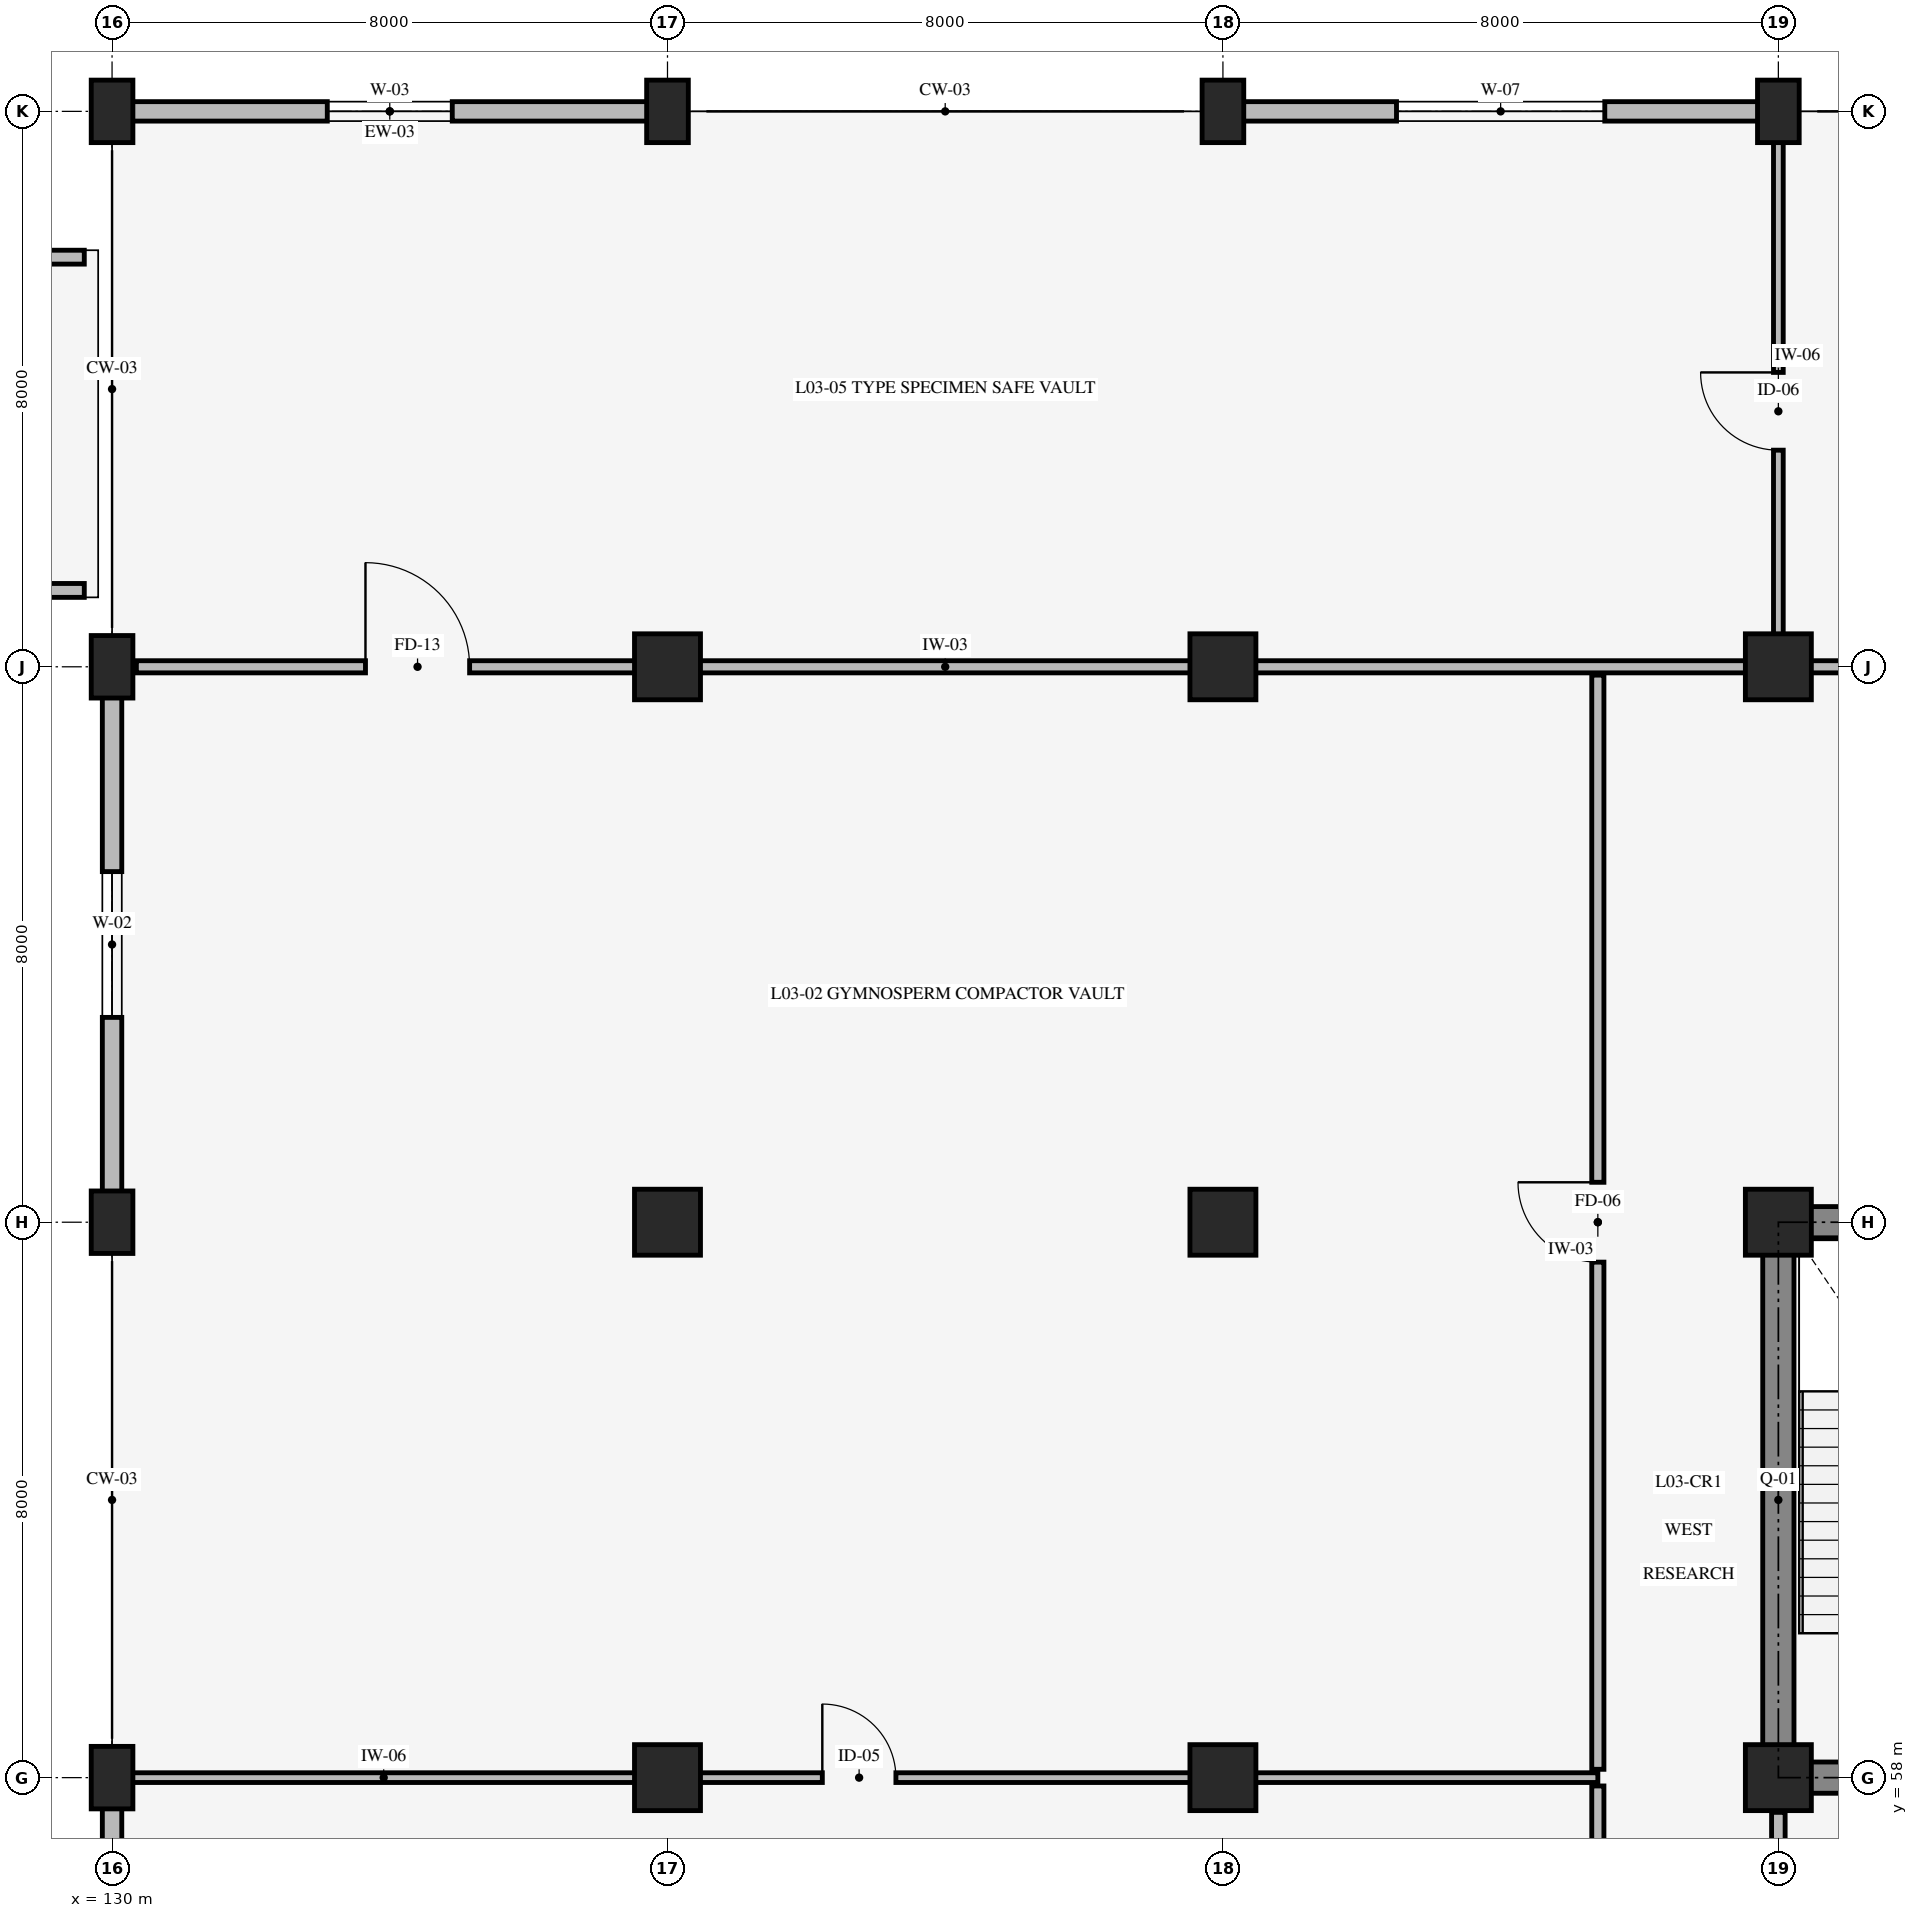
"""IFC4 building model, lengths in metres.
Left out: names, types, materials, properties, quantities, classifications, styles, units other than length and angle.
Written with IfcOpenShell. Run it as: python <this file> out.ifc"""

import sys

from ifc_helpers import new_model, si_unit, direction, frame, frame_2d, origin, origin_2d, place, context, subcontext, project, spatial, rectangle, extrude, element, fill, save


model = new_model("IFC4")
c1 = context("Model", 3, precision=1e-05, world=origin(), true_north=direction((0.0, 1.0)))
c2 = subcontext(c1, "Body", "Model", "MODEL_VIEW")
j1 = project(units=[si_unit("LENGTHUNIT", "METRE"), si_unit("PLANEANGLEUNIT", "RADIAN")], contexts=[c1])
p1 = place(None, origin())
s1 = spatial("IfcSite", under=j1, at=p1, CompositionType="ELEMENT")
p2 = place(p1, origin())
s2 = spatial("IfcBuilding", under=s1, at=p2, CompositionType="ELEMENT")
p3 = place(p2, frame((0.0, 0.0, 10.2)))
s3 = spatial("IfcBuildingStorey", under=s2, at=p3, CompositionType="ELEMENT", Elevation=10.2)
p4 = place(p3, frame((154.0, 58.0, 0.0), z_axis=(0.0, 0.0, 1.0), x_axis=(1.0, 0.0, 0.0)))
e1 = element("IfcWall", 1, at=p4, inside=s3, PredefinedType="SHEAR", context=c2, shape_type="SweptSolid", body=[
    extrude(rectangle(XDim=8.0, YDim=0.45, at=frame_2d((4.0, 0.0))), origin(), (0.0, 0.0, 1.0), 4.55),
])
p5 = place(p4, frame((1.4, 0.0, 0.0)))
e2 = element("IfcOpeningElement", 2, at=p5, cuts=e1, PredefinedType="OPENING", context=c2, shape_type="SweptSolid", body=[
    extrude(rectangle(XDim=1.3, YDim=2.15, at=frame_2d((0.65, 1.075))), frame((0.0, 0.235, 0.0), z_axis=(0.0, -1.0, 0.0), x_axis=(1.0, 0.0, 0.0)), (0.0, 0.0, 1.0), 0.47),
])
p6 = place(p4, frame((5.3, 0.0, 0.0)))
e3 = element("IfcOpeningElement", 3, at=p6, cuts=e1, PredefinedType="OPENING", context=c2, shape_type="SweptSolid", body=[
    extrude(rectangle(XDim=1.1, YDim=2.2, at=frame_2d((0.55, 1.1))), frame((0.0, 0.235, 0.0), z_axis=(0.0, -1.0, 0.0), x_axis=(1.0, 0.0, 0.0)), (0.0, 0.0, 1.0), 0.47),
])
for number, where, z_axis, x_axis in (
    (4, (162.0, 66.0, 0.0), (0.0, 0.0, 1.0), (-1.0, 0.0, 0.0)),
    (5, (154.0, 66.0, 0.0), (0.0, 0.0, 1.0), (0.0, -1.0, 0.0)),
):
    element("IfcWall", number, at=place(p3, frame(where, z_axis=z_axis, x_axis=x_axis)), inside=s3, PredefinedType="SHEAR", context=c2, shape_type="SweptSolid", body=[
        extrude(rectangle(XDim=8.0, YDim=0.45, at=frame_2d((4.0, 0.0))), origin(), (0.0, 0.0, 1.0), 4.55),
    ])
for number, where, z_axis, x_axis in (
    (6, (130.0, 58.0, 0.0), (0.0, 0.0, 1.0), (1.0, 0.0, 0.0)),
    (7, (130.0, 66.0, 0.0), (0.0, 0.0, 1.0), (1.0, 0.0, 0.0)),
    (8, (130.0, 74.0, 0.0), (0.0, 0.0, 1.0), (1.0, 0.0, 0.0)),
    (9, (130.0, 82.0, 0.0), (0.0, 0.0, 1.0), (1.0, 0.0, 0.0)),
):
    element("IfcColumn", number, at=place(p3, frame(where, z_axis=z_axis, x_axis=x_axis)), inside=s3, PredefinedType="COLUMN", context=c2, shape_type="SweptSolid", body=[
        extrude(rectangle(XDim=0.6, YDim=0.9, at=origin_2d()), origin(), (0.0, 0.0, 1.0), 4.8),
    ])
for number, where, z_axis, x_axis in (
    (10, (138.0, 58.0, 0.0), (0.0, 0.0, 1.0), (1.0, 0.0, 0.0)),
    (11, (138.0, 66.0, 0.0), (0.0, 0.0, 1.0), (1.0, 0.0, 0.0)),
    (12, (138.0, 74.0, 0.0), (0.0, 0.0, 1.0), (1.0, 0.0, 0.0)),
):
    element("IfcColumn", number, at=place(p3, frame(where, z_axis=z_axis, x_axis=x_axis)), inside=s3, PredefinedType="COLUMN", context=c2, shape_type="SweptSolid", body=[
        extrude(rectangle(XDim=0.95, YDim=0.95, at=origin_2d()), origin(), (0.0, 0.0, 1.0), 4.8),
    ])
p7 = place(p3, frame((138.0, 82.0, 0.0), z_axis=(0.0, 0.0, 1.0), x_axis=(1.0, 0.0, 0.0)))
e13 = element("IfcColumn", 13, at=p7, inside=s3, PredefinedType="COLUMN", context=c2, shape_type="SweptSolid", body=[
    extrude(rectangle(XDim=0.6, YDim=0.9, at=origin_2d()), origin(), (0.0, 0.0, 1.0), 4.8),
])
for number, where, z_axis, x_axis in (
    (14, (146.0, 58.0, 0.0), (0.0, 0.0, 1.0), (1.0, 0.0, 0.0)),
    (15, (146.0, 66.0, 0.0), (0.0, 0.0, 1.0), (1.0, 0.0, 0.0)),
    (16, (146.0, 74.0, 0.0), (0.0, 0.0, 1.0), (1.0, 0.0, 0.0)),
):
    element("IfcColumn", number, at=place(p3, frame(where, z_axis=z_axis, x_axis=x_axis)), inside=s3, PredefinedType="COLUMN", context=c2, shape_type="SweptSolid", body=[
        extrude(rectangle(XDim=0.95, YDim=0.95, at=origin_2d()), origin(), (0.0, 0.0, 1.0), 4.8),
    ])
p8 = place(p3, frame((146.0, 82.0, 0.0), z_axis=(0.0, 0.0, 1.0), x_axis=(1.0, 0.0, 0.0)))
e17 = element("IfcColumn", 17, at=p8, inside=s3, PredefinedType="COLUMN", context=c2, shape_type="SweptSolid", body=[
    extrude(rectangle(XDim=0.6, YDim=0.9, at=origin_2d()), origin(), (0.0, 0.0, 1.0), 4.8),
])
for number, where, z_axis, x_axis in (
    (18, (154.0, 58.0, 0.0), (0.0, 0.0, 1.0), (1.0, 0.0, 0.0)),
    (19, (154.0, 66.0, 0.0), (0.0, 0.0, 1.0), (1.0, 0.0, 0.0)),
    (20, (154.0, 74.0, 0.0), (0.0, 0.0, 1.0), (1.0, 0.0, 0.0)),
):
    element("IfcColumn", number, at=place(p3, frame(where, z_axis=z_axis, x_axis=x_axis)), inside=s3, PredefinedType="COLUMN", context=c2, shape_type="SweptSolid", body=[
        extrude(rectangle(XDim=0.95, YDim=0.95, at=origin_2d()), origin(), (0.0, 0.0, 1.0), 4.8),
    ])
p9 = place(p3, frame((154.0, 82.0, 0.0), z_axis=(0.0, 0.0, 1.0), x_axis=(1.0, 0.0, 0.0)))
e21 = element("IfcColumn", 21, at=p9, inside=s3, PredefinedType="COLUMN", context=c2, shape_type="SweptSolid", body=[
    extrude(rectangle(XDim=0.6, YDim=0.9, at=origin_2d()), origin(), (0.0, 0.0, 1.0), 4.8),
])
p10 = place(p3, frame((130.0, 50.0, 0.0), z_axis=(0.0, 0.0, 1.0), x_axis=(0.0, 1.0, 0.0)))
e22 = element("IfcWall", 22, at=p10, inside=s3, PredefinedType="STANDARD", context=c2, shape_type="SweptSolid", body=[
    extrude(rectangle(XDim=8.0, YDim=0.28, at=frame_2d((4.0, 0.0))), origin(), (0.0, 0.0, 1.0), 4.0),
])
p11 = place(p10, frame((2.8, 0.0, 0.85)))
e23 = element("IfcOpeningElement", 23, at=p11, cuts=e22, PredefinedType="OPENING", context=c2, shape_type="SweptSolid", body=[
    extrude(rectangle(XDim=2.4, YDim=1.8, at=frame_2d((1.2, 0.9))), frame((0.0, 0.15, 0.0), z_axis=(0.0, -1.0, 0.0), x_axis=(1.0, 0.0, 0.0)), (0.0, 0.0, 1.0), 0.3),
])
p12 = place(p3, frame((130.0, 66.0, 0.0), z_axis=(0.0, 0.0, 1.0), x_axis=(0.0, 1.0, 0.0)))
e24 = element("IfcWall", 24, at=p12, inside=s3, PredefinedType="STANDARD", context=c2, shape_type="SweptSolid", body=[
    extrude(rectangle(XDim=8.0, YDim=0.28, at=frame_2d((4.0, 0.0))), origin(), (0.0, 0.0, 1.0), 4.0),
])
p13 = place(p12, frame((2.95, 0.0, 0.85)))
e25 = element("IfcOpeningElement", 25, at=p13, cuts=e24, PredefinedType="OPENING", context=c2, shape_type="SweptSolid", body=[
    extrude(rectangle(XDim=2.1, YDim=1.6, at=frame_2d((1.05, 0.8))), frame((0.0, 0.15, 0.0), z_axis=(0.0, -1.0, 0.0), x_axis=(1.0, 0.0, 0.0)), (0.0, 0.0, 1.0), 0.3),
])
p14 = place(p3, frame((130.0, 82.0, 0.0), z_axis=(0.0, 0.0, 1.0), x_axis=(1.0, 0.0, 0.0)))
e26 = element("IfcWall", 26, at=p14, inside=s3, PredefinedType="STANDARD", context=c2, shape_type="SweptSolid", body=[
    extrude(rectangle(XDim=8.0, YDim=0.28, at=frame_2d((4.0, 0.0))), origin(), (0.0, 0.0, 1.0), 4.0),
])
p15 = place(p14, frame((3.1, 0.0, 0.85)))
e27 = element("IfcOpeningElement", 27, at=p15, cuts=e26, PredefinedType="OPENING", context=c2, shape_type="SweptSolid", body=[
    extrude(rectangle(XDim=1.8, YDim=1.4, at=frame_2d((0.9, 0.7))), frame((0.0, 0.15, 0.0), z_axis=(0.0, -1.0, 0.0), x_axis=(1.0, 0.0, 0.0)), (0.0, 0.0, 1.0), 0.3),
])
p16 = place(p3, frame((146.0, 82.0, 0.0), z_axis=(0.0, 0.0, 1.0), x_axis=(1.0, 0.0, 0.0)))
e28 = element("IfcWall", 28, at=p16, inside=s3, PredefinedType="STANDARD", context=c2, shape_type="SweptSolid", body=[
    extrude(rectangle(XDim=8.0, YDim=0.28, at=frame_2d((4.0, 0.0))), origin(), (0.0, 0.0, 1.0), 3.63),
])
p17 = place(p16, frame((2.5, 0.0, 0.85)))
e29 = element("IfcOpeningElement", 29, at=p17, cuts=e28, PredefinedType="OPENING", context=c2, shape_type="SweptSolid", body=[
    extrude(rectangle(XDim=3.0, YDim=1.8, at=frame_2d((1.5, 0.9))), frame((0.0, 0.15, 0.0), z_axis=(0.0, -1.0, 0.0), x_axis=(1.0, 0.0, 0.0)), (0.0, 0.0, 1.0), 0.3),
])
p18 = place(p3, frame((67.43, 75.1, 0.0), z_axis=(0.0, 0.0, 1.0), x_axis=(1.0, 0.0, 0.0)))
e30 = element("IfcWall", 30, at=p18, inside=s3, PredefinedType="PARAPET", context=c2, shape_type="SweptSolid", body=[
    extrude(rectangle(XDim=62.17, YDim=0.2, at=frame_2d((31.085, 0.0))), origin(), (0.0, 0.0, 1.0), 0.65),
])
p19 = place(p3, frame((129.6, 79.9, 0.0), z_axis=(0.0, 0.0, 1.0), x_axis=(-1.0, 0.0, 0.0)))
e31 = element("IfcWall", 31, at=p19, inside=s3, PredefinedType="PARAPET", context=c2, shape_type="SweptSolid", body=[
    extrude(rectangle(XDim=63.63, YDim=0.2, at=frame_2d((31.815, 0.0))), origin(), (0.0, 0.0, 1.0), 0.65),
])
p20 = place(p3, frame((154.0, 55.2, 0.0), z_axis=(0.0, 0.0, 1.0), x_axis=(0.0, 1.0, 0.0)))
e32 = element("IfcWall", 32, at=p20, inside=s3, PredefinedType="STANDARD", context=c2, shape_type="SweptSolid", body=[
    extrude(rectangle(XDim=2.3, YDim=0.195, at=frame_2d((1.15, 0.0))), origin(), (0.0, 0.0, 1.0), 3.68),
])
p21 = place(p3, frame((151.4, 34.12, 0.0), z_axis=(0.0, 0.0, 1.0), x_axis=(0.0, 1.0, 0.0)))
e33 = element("IfcWall", 33, at=p21, inside=s3, PredefinedType="STANDARD", context=c2, shape_type="SweptSolid", body=[
    extrude(rectangle(XDim=23.76, YDim=0.175, at=frame_2d((11.88, 0.0))), origin(), (0.0, 0.0, 1.0), 4.5),
])
p22 = place(p21, frame((11.33, 0.0, 0.0)))
e34 = element("IfcOpeningElement", 34, at=p22, cuts=e33, PredefinedType="OPENING", context=c2, shape_type="SweptSolid", body=[
    extrude(rectangle(XDim=1.1, YDim=2.1, at=frame_2d((0.55, 1.05))), frame((0.0, 0.098, 0.0), z_axis=(0.0, -1.0, 0.0), x_axis=(1.0, 0.0, 0.0)), (0.0, 0.0, 1.0), 0.195),
])
p23 = place(p3, frame((130.12, 58.0, 0.0), z_axis=(0.0, 0.0, 1.0), x_axis=(1.0, 0.0, 0.0)))
e35 = element("IfcWall", 35, at=p23, inside=s3, PredefinedType="STANDARD", context=c2, shape_type="SweptSolid", body=[
    extrude(rectangle(XDim=21.28, YDim=0.14, at=frame_2d((10.64, 0.0))), origin(), (0.0, 0.0, 1.0), 3.63),
])
p24 = place(p23, frame((10.11, 0.0, 0.0)))
e36 = element("IfcOpeningElement", 36, at=p24, cuts=e35, PredefinedType="OPENING", context=c2, shape_type="SweptSolid", body=[
    extrude(rectangle(XDim=1.06, YDim=2.12, at=frame_2d((0.53, 1.06))), frame((0.0, 0.08, 0.0), z_axis=(0.0, -1.0, 0.0), x_axis=(1.0, 0.0, 0.0)), (0.0, 0.0, 1.0), 0.16),
])
p25 = place(p3, frame((151.4, 58.12, 0.0), z_axis=(0.0, 0.0, 1.0), x_axis=(0.0, 1.0, 0.0)))
e37 = element("IfcWall", 37, at=p25, inside=s3, PredefinedType="STANDARD", context=c2, shape_type="SweptSolid", body=[
    extrude(rectangle(XDim=15.76, YDim=0.175, at=frame_2d((7.88, 0.0))), origin(), (0.0, 0.0, 1.0), 4.5),
])
p26 = place(p25, frame((7.305, 0.0, 0.0)))
e38 = element("IfcOpeningElement", 38, at=p26, cuts=e37, PredefinedType="OPENING", context=c2, shape_type="SweptSolid", body=[
    extrude(rectangle(XDim=1.15, YDim=2.1, at=frame_2d((0.575, 1.05))), frame((0.0, 0.098, 0.0), z_axis=(0.0, -1.0, 0.0), x_axis=(1.0, 0.0, 0.0)), (0.0, 0.0, 1.0), 0.195),
])
p27 = place(p3, frame((130.35, 74.0, 0.0), z_axis=(0.0, 0.0, 1.0), x_axis=(1.0, 0.0, 0.0)))
e39 = element("IfcWall", 39, at=p27, inside=s3, PredefinedType="STANDARD", context=c2, shape_type="SweptSolid", body=[
    extrude(rectangle(XDim=23.3, YDim=0.175, at=frame_2d((11.65, 0.0))), origin(), (0.0, 0.0, 1.0), 3.63),
])
p28 = place(p27, frame((3.3, 0.0, 0.0)))
e40 = element("IfcOpeningElement", 40, at=p28, cuts=e39, PredefinedType="OPENING", context=c2, shape_type="SweptSolid", body=[
    extrude(rectangle(XDim=1.5, YDim=2.2, at=frame_2d((0.75, 1.1))), frame((0.0, 0.098, 0.0), z_axis=(0.0, -1.0, 0.0), x_axis=(1.0, 0.0, 0.0)), (0.0, 0.0, 1.0), 0.195),
])
p29 = place(p3, frame((154.0, 74.12, 0.0), z_axis=(0.0, 0.0, 1.0), x_axis=(0.0, 1.0, 0.0)))
e41 = element("IfcWall", 41, at=p29, inside=s3, PredefinedType="STANDARD", context=c2, shape_type="SweptSolid", body=[
    extrude(rectangle(XDim=7.83, YDim=0.14, at=frame_2d((3.915, 0.0))), origin(), (0.0, 0.0, 1.0), 3.68),
])
p30 = place(p29, frame((3.0, 0.0, 0.0)))
e42 = element("IfcOpeningElement", 42, at=p30, cuts=e41, PredefinedType="OPENING", context=c2, shape_type="SweptSolid", body=[
    extrude(rectangle(XDim=1.12, YDim=2.12, at=frame_2d((0.56, 1.06))), frame((0.0, 0.08, 0.0), z_axis=(0.0, -1.0, 0.0), x_axis=(1.0, 0.0, 0.0)), (0.0, 0.0, 1.0), 0.16),
])
p31 = place(p3, frame((154.35, 74.0, 0.0), z_axis=(0.0, 0.0, 1.0), x_axis=(1.0, 0.0, 0.0)))
e43 = element("IfcWall", 43, at=p31, inside=s3, PredefinedType="STANDARD", context=c2, shape_type="SweptSolid", body=[
    extrude(rectangle(XDim=22.7, YDim=0.175, at=frame_2d((11.35, 0.0))), origin(), (0.0, 0.0, 1.0), 3.63),
])
p32 = place(p31, frame((3.3, 0.0, 0.0)))
e44 = element("IfcOpeningElement", 44, at=p32, cuts=e43, PredefinedType="OPENING", context=c2, shape_type="SweptSolid", body=[
    extrude(rectangle(XDim=1.55, YDim=2.25, at=frame_2d((0.775, 1.125))), frame((0.0, 0.098, 0.0), z_axis=(0.0, -1.0, 0.0), x_axis=(1.0, 0.0, 0.0)), (0.0, 0.0, 1.0), 0.195),
])
p33 = place(p13, origin())
e45 = element("IfcWindow", 45, at=p33, inside=s3, PartitioningType="SINGLE_PANEL", PredefinedType="WINDOW", context=c2, shape_type="SweptSolid", body=[
    extrude(rectangle(XDim=2.1, YDim=1.6, at=frame_2d((1.05, 0.8))), frame((0.0, 0.03, 0.0), z_axis=(0.0, -1.0, 0.0), x_axis=(1.0, 0.0, 0.0)), (0.0, 0.0, 1.0), 0.06),
])
fill(e25, e45)
p34 = place(p15, origin())
e46 = element("IfcWindow", 46, at=p34, inside=s3, PartitioningType="SINGLE_PANEL", PredefinedType="WINDOW", context=c2, shape_type="SweptSolid", body=[
    extrude(rectangle(XDim=1.8, YDim=1.4, at=frame_2d((0.9, 0.7))), frame((0.0, 0.03, 0.0), z_axis=(0.0, -1.0, 0.0), x_axis=(1.0, 0.0, 0.0)), (0.0, 0.0, 1.0), 0.06),
])
fill(e27, e46)
p35 = place(p17, origin())
e47 = element("IfcWindow", 47, at=p35, inside=s3, PartitioningType="SINGLE_PANEL", PredefinedType="WINDOW", context=c2, shape_type="SweptSolid", body=[
    extrude(rectangle(XDim=3.0, YDim=1.8, at=frame_2d((1.5, 0.9))), frame((0.0, 0.03, 0.0), z_axis=(0.0, -1.0, 0.0), x_axis=(1.0, 0.0, 0.0)), (0.0, 0.0, 1.0), 0.06),
])
fill(e29, e47)
p36 = place(p24, origin())
e48 = element("IfcDoor", 48, at=p36, inside=s3, OperationType="SINGLE_SWING_LEFT", PredefinedType="DOOR", context=c2, shape_type="SweptSolid", body=[
    extrude(rectangle(XDim=1.06, YDim=2.12, at=frame_2d((0.53, 1.06))), frame((0.0, 0.025, 0.0), z_axis=(0.0, -1.0, 0.0), x_axis=(1.0, 0.0, 0.0)), (0.0, 0.0, 1.0), 0.05),
])
fill(e36, e48)
p37 = place(p26, origin())
e49 = element("IfcDoor", 49, at=p37, inside=s3, OperationType="SINGLE_SWING_RIGHT", PredefinedType="DOOR", context=c2, shape_type="SweptSolid", body=[
    extrude(rectangle(XDim=1.15, YDim=2.1, at=frame_2d((0.575, 1.05))), frame((0.0, 0.025, 0.0), z_axis=(0.0, -1.0, 0.0), x_axis=(1.0, 0.0, 0.0)), (0.0, 0.0, 1.0), 0.05),
])
fill(e38, e49)
p38 = place(p28, origin())
e50 = element("IfcDoor", 50, at=p38, inside=s3, OperationType="SINGLE_SWING_LEFT", PredefinedType="DOOR", context=c2, shape_type="SweptSolid", body=[
    extrude(rectangle(XDim=1.5, YDim=2.2, at=frame_2d((0.75, 1.1))), frame((0.0, 0.025, 0.0), z_axis=(0.0, -1.0, 0.0), x_axis=(1.0, 0.0, 0.0)), (0.0, 0.0, 1.0), 0.05),
])
fill(e40, e50)
p39 = place(p30, origin())
e51 = element("IfcDoor", 51, at=p39, inside=s3, OperationType="SINGLE_SWING_RIGHT", PredefinedType="DOOR", context=c2, shape_type="SweptSolid", body=[
    extrude(rectangle(XDim=1.12, YDim=2.12, at=frame_2d((0.56, 1.06))), frame((0.0, 0.025, 0.0), z_axis=(0.0, -1.0, 0.0), x_axis=(1.0, 0.0, 0.0)), (0.0, 0.0, 1.0), 0.05),
])
fill(e42, e51)
save(model, sys.argv[1])
